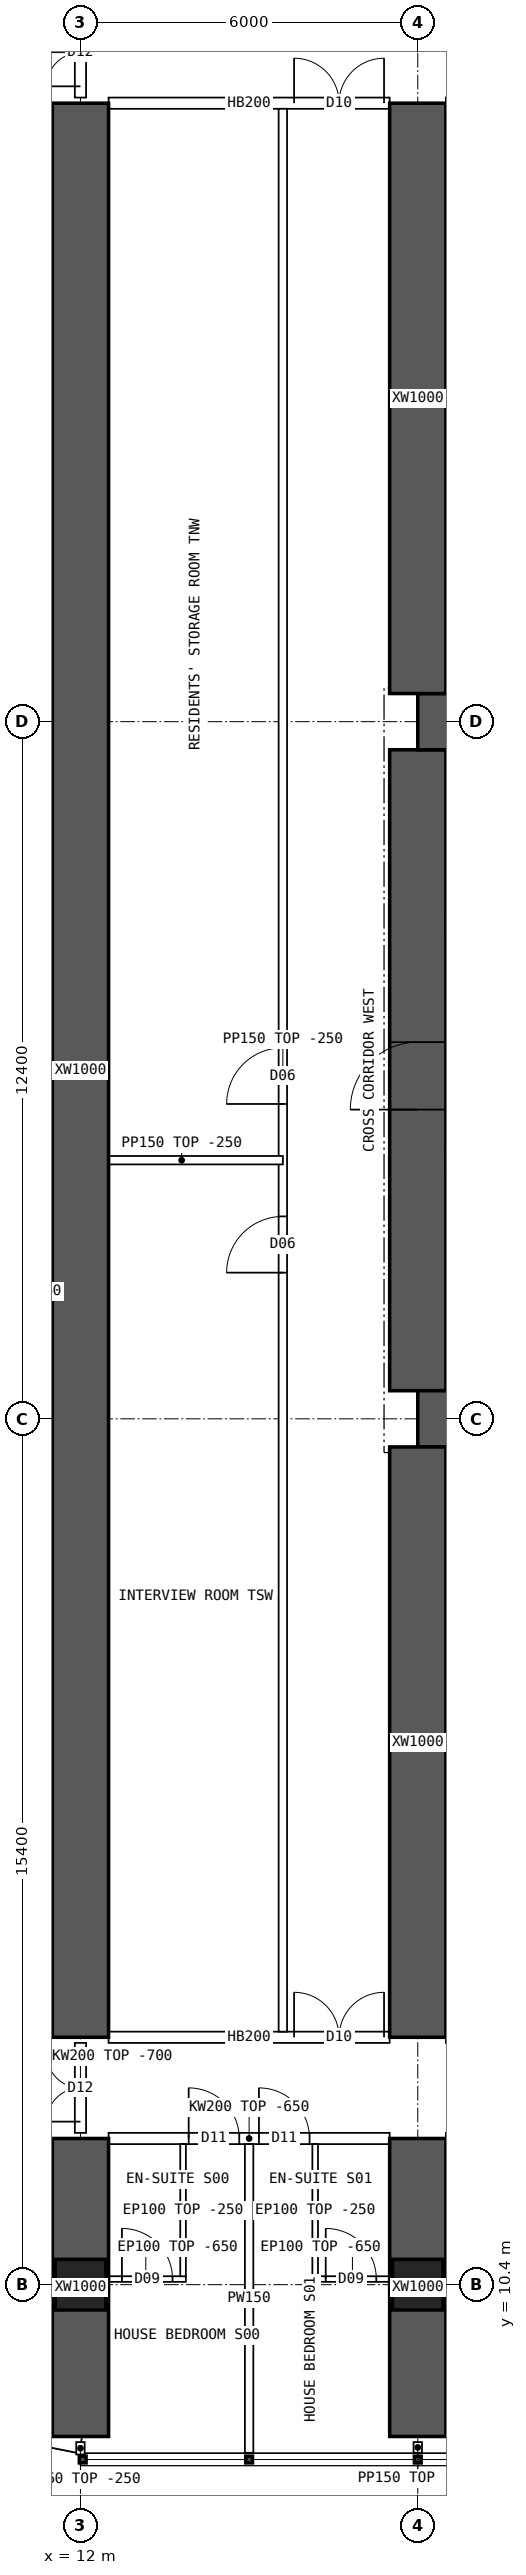
"""IFC4 building model, lengths in metres.
Left out: names, types, materials, properties, quantities, classifications, styles, units other than length and angle.
Written with IfcOpenShell. Run it as: python <this file> out.ifc"""

import sys

from ifc_helpers import new_model, si_unit, direction, frame, frame_2d, origin, origin_2d, place, context, subcontext, project, spatial, polyline, rectangle, hollow_rectangle, outline, extrude, element, fill, save


model = new_model("IFC4")
c1 = context("Model", 3, precision=1e-05, world=origin(), true_north=direction((0.0, 1.0)))
c2 = subcontext(c1, "Body", "Model", "MODEL_VIEW")
j1 = project(units=[si_unit("LENGTHUNIT", "METRE"), si_unit("PLANEANGLEUNIT", "RADIAN")], contexts=[c1])
p1 = place(None, origin())
s1 = spatial("IfcSite", under=j1, at=p1, CompositionType="ELEMENT")
p2 = place(p1, origin())
s2 = spatial("IfcBuilding", under=s1, at=p2, CompositionType="ELEMENT")
p3 = place(p2, frame((0.0, 0.0, 27.7)))
s3 = spatial("IfcBuildingStorey", under=s2, at=p3, CompositionType="ELEMENT", Elevation=27.7)
for number, where, z_axis, x_axis in (
    (1, (12.0, 10.4, 0.0), (0.0, 0.0, 1.0), (1.0, 0.0, 0.0)),
    (2, (18.0, 10.4, 0.0), (0.0, 0.0, 1.0), (1.0, 0.0, 0.0)),
):
    element("IfcColumn", number, at=place(p3, frame(where, z_axis=z_axis, x_axis=x_axis)), inside=s3, PredefinedType="COLUMN", context=c2, shape_type="SweptSolid", body=[
        extrude(hollow_rectangle(XDim=0.9, YDim=0.9, WallThickness=0.09, at=origin_2d()), origin(), (0.0, 0.0, 1.0), 3.75),
    ])
for number, where, z_axis, x_axis in (
    (3, (18.0, 25.8, 0.0), (0.0, 0.0, 1.0), (1.0, 0.0, 0.0)),
    (4, (18.0, 38.2, 0.0), (0.0, 0.0, 1.0), (1.0, 0.0, 0.0)),
):
    element("IfcWall", number, at=place(p3, frame(where, z_axis=z_axis, x_axis=x_axis)), inside=s3, PredefinedType="SHEAR", context=c2, shape_type="SweptSolid", body=[
        extrude(rectangle(XDim=48.0, YDim=1.0, at=frame_2d((24.0, 0.0))), origin(), (0.0, 0.0, 1.0), 3.75),
    ])
p4 = place(p3, frame((18.0, 26.3, 0.0), z_axis=(0.0, 0.0, 1.0), x_axis=(0.0, 1.0, 0.0)))
e5 = element("IfcWall", 5, at=p4, inside=s3, PredefinedType="SHEAR", context=c2, shape_type="SweptSolid", body=[
    extrude(rectangle(XDim=11.4, YDim=1.0, at=frame_2d((5.7, 0.0))), origin(), (0.0, 0.0, 1.0), 3.75),
])
p5 = place(p4, frame((5.0, 0.0, 0.0)))
e6 = element("IfcOpeningElement", 6, at=p5, cuts=e5, PredefinedType="OPENING", context=c2, shape_type="SweptSolid", body=[
    extrude(rectangle(XDim=1.2, YDim=2.1, at=frame_2d((0.6, 1.05))), frame((0.0, 0.51, 0.0), z_axis=(0.0, -1.0, 0.0), x_axis=(1.0, 0.0, 0.0)), (0.0, 0.0, 1.0), 1.02),
])
p6 = place(p3, frame((12.0, 7.7, 0.0), z_axis=(0.0, 0.0, 1.0), x_axis=(0.0, 1.0, 0.0)))
e7 = element("IfcWall", 7, at=p6, inside=s3, PredefinedType="SHEAR", context=c2, shape_type="SweptSolid", body=[
    extrude(rectangle(XDim=5.3, YDim=1.0, at=frame_2d((2.65, 0.0))), origin(), (0.0, 0.0, 1.0), 3.75),
])
p7 = place(p3, frame((12.0, 14.8, 0.0), z_axis=(0.0, 0.0, 1.0), x_axis=(0.0, 1.0, 0.0)))
e8 = element("IfcWall", 8, at=p7, inside=s3, PredefinedType="SHEAR", context=c2, shape_type="SweptSolid", body=[
    extrude(rectangle(XDim=34.4, YDim=1.0, at=frame_2d((17.2, 0.0))), origin(), (0.0, 0.0, 1.0), 3.75),
])
p8 = place(p3, frame((18.0, 7.7, 0.0), z_axis=(0.0, 0.0, 1.0), x_axis=(0.0, 1.0, 0.0)))
e9 = element("IfcWall", 9, at=p8, inside=s3, PredefinedType="SHEAR", context=c2, shape_type="SweptSolid", body=[
    extrude(rectangle(XDim=5.3, YDim=1.0, at=frame_2d((2.65, 0.0))), origin(), (0.0, 0.0, 1.0), 3.75),
])
for number, where, z_axis, x_axis in (
    (10, (18.0, 14.8, 0.0), (0.0, 0.0, 1.0), (0.0, 1.0, 0.0)),
    (11, (18.0, 38.7, 0.0), (0.0, 0.0, 1.0), (0.0, 1.0, 0.0)),
):
    element("IfcWall", number, at=place(p3, frame(where, z_axis=z_axis, x_axis=x_axis)), inside=s3, PredefinedType="SHEAR", context=c2, shape_type="SweptSolid", body=[
        extrude(rectangle(XDim=10.5, YDim=1.0, at=frame_2d((5.25, 0.0))), origin(), (0.0, 0.0, 1.0), 3.75),
    ])
p9 = place(p3, frame((8.843, 8.178, 0.0), z_axis=(0.0, 0.0, 1.0), x_axis=(0.980787251524, -0.195080412259, 0.0)))
e12 = element("IfcWall", 12, at=p9, inside=s3, PredefinedType="SOLIDWALL", context=c2, shape_type="SweptSolid", body=[
    extrude(outline(polyline([(-0.03, -0.15), (3.249, -0.15), (3.189, 0.15), (0.03, 0.15), (-0.03, -0.15)])), origin(), (0.0, 0.0, 1.0), 3.5),
])
p10 = place(p9, frame((0.909, 0.0, 0.9)))
e13 = element("IfcOpeningElement", 13, at=p10, cuts=e12, PredefinedType="OPENING", context=c2, shape_type="SweptSolid", body=[
    extrude(rectangle(XDim=1.4, YDim=1.8, at=frame_2d((0.7, 0.9))), frame((0.0, 0.16, 0.0), z_axis=(0.0, -1.0, 0.0), x_axis=(1.0, 0.0, 0.0)), (0.0, 0.0, 1.0), 0.32),
])
p11 = place(p3, frame((12.5, 13.0, 0.0), z_axis=(0.0, 0.0, 1.0), x_axis=(1.0, 0.0, 0.0)))
e14 = element("IfcWall", 14, at=p11, inside=s3, PredefinedType="SOLIDWALL", context=c2, shape_type="SweptSolid", body=[
    extrude(outline(polyline([(0.0, 0.0), (5.0, 0.0), (5.0, 3.1), (0.0, 3.1), (0.0, 0.0)])), frame((0.0, 0.1, 0.0), z_axis=(0.0, -1.0, 0.0), x_axis=(1.0, 0.0, 0.0)), (0.0, 0.0, 1.0), 0.2),
])
p12 = place(p11, frame((1.425, 0.0, 0.0)))
e15 = element("IfcOpeningElement", 15, at=p12, cuts=e14, PredefinedType="OPENING", context=c2, shape_type="SweptSolid", body=[
    extrude(rectangle(XDim=0.9, YDim=2.1, at=frame_2d((0.45, 1.05))), frame((0.0, 0.11, 0.0), z_axis=(0.0, -1.0, 0.0), x_axis=(1.0, 0.0, 0.0)), (0.0, 0.0, 1.0), 0.22),
])
p13 = place(p11, frame((2.675, 0.0, 0.0)))
e16 = element("IfcOpeningElement", 16, at=p13, cuts=e14, PredefinedType="OPENING", context=c2, shape_type="SweptSolid", body=[
    extrude(rectangle(XDim=0.9, YDim=2.1, at=frame_2d((0.45, 1.05))), frame((0.0, 0.11, 0.0), z_axis=(0.0, -1.0, 0.0), x_axis=(1.0, 0.0, 0.0)), (0.0, 0.0, 1.0), 0.22),
])
p14 = place(p3, frame((12.5, 14.8, 0.0), z_axis=(0.0, 0.0, 1.0), x_axis=(1.0, 0.0, 0.0)))
e17 = element("IfcWall", 17, at=p14, inside=s3, PredefinedType="SOLIDWALL", context=c2, shape_type="SweptSolid", body=[
    extrude(rectangle(XDim=5.0, YDim=0.2, at=frame_2d((2.5, 0.0))), origin(), (0.0, 0.0, 1.0), 3.5),
])
p15 = place(p14, frame((3.3, 0.0, 0.0)))
e18 = element("IfcOpeningElement", 18, at=p15, cuts=e17, PredefinedType="OPENING", context=c2, shape_type="SweptSolid", body=[
    extrude(rectangle(XDim=1.6, YDim=2.1, at=frame_2d((0.8, 1.05))), frame((0.0, 0.11, 0.0), z_axis=(0.0, -1.0, 0.0), x_axis=(1.0, 0.0, 0.0)), (0.0, 0.0, 1.0), 0.22),
])
p16 = place(p3, frame((12.5, 49.2, 0.0), z_axis=(0.0, 0.0, 1.0), x_axis=(1.0, 0.0, 0.0)))
e19 = element("IfcWall", 19, at=p16, inside=s3, PredefinedType="SOLIDWALL", context=c2, shape_type="SweptSolid", body=[
    extrude(rectangle(XDim=5.0, YDim=0.2, at=frame_2d((2.5, 0.0))), origin(), (0.0, 0.0, 1.0), 3.5),
])
p17 = place(p16, frame((3.3, 0.0, 0.0)))
e20 = element("IfcOpeningElement", 20, at=p17, cuts=e19, PredefinedType="OPENING", context=c2, shape_type="SweptSolid", body=[
    extrude(rectangle(XDim=1.6, YDim=2.1, at=frame_2d((0.8, 1.05))), frame((0.0, 0.11, 0.0), z_axis=(0.0, -1.0, 0.0), x_axis=(1.0, 0.0, 0.0)), (0.0, 0.0, 1.0), 0.22),
])
p18 = place(p3, frame((15.0, 7.41, 0.0), z_axis=(0.0, 0.0, 1.0), x_axis=(0.0, 1.0, 0.0)))
e21 = element("IfcWall", 21, at=p18, inside=s3, PredefinedType="PARTITIONING", context=c2, shape_type="SweptSolid", body=[
    extrude(outline(polyline([(0.0, 0.0), (5.49, 0.0), (5.49, 3.1), (5.442, 3.1), (5.44, 3.5), (3.192, 3.5), (3.19, 3.1), (2.792, 3.1), (2.79, 3.5), (0.0, 3.5), (0.0, 0.0)])), frame((0.0, 0.075, 0.0), z_axis=(0.0, -1.0, 0.0), x_axis=(1.0, 0.0, 0.0)), (0.0, 0.0, 1.0), 0.15),
])
p19 = place(p3, frame((13.875, 10.5, 0.0), z_axis=(0.0, 0.0, 1.0), x_axis=(-1.0, 0.0, 0.0)))
e22 = element("IfcWall", 22, at=p19, inside=s3, PredefinedType="PARTITIONING", context=c2, shape_type="SweptSolid", body=[
    extrude(outline(polyline([(0.0, 0.0), (1.425, 0.0), (1.425, 3.1), (0.0, 3.1), (0.0, 0.0)])), frame((0.0, 0.05, 0.0), z_axis=(0.0, -1.0, 0.0), x_axis=(1.0, 0.0, 0.0)), (0.0, 0.0, 1.0), 0.1),
])
p20 = place(p19, frame((0.238, 0.0, 0.0)))
e23 = element("IfcOpeningElement", 23, at=p20, cuts=e22, PredefinedType="OPENING", context=c2, shape_type="SweptSolid", body=[
    extrude(rectangle(XDim=0.9, YDim=2.1, at=frame_2d((0.45, 1.05))), frame((0.0, 0.06, 0.0), z_axis=(0.0, -1.0, 0.0), x_axis=(1.0, 0.0, 0.0)), (0.0, 0.0, 1.0), 0.12),
])
p21 = place(p3, frame((13.825, 10.55, 0.0), z_axis=(0.0, 0.0, 1.0), x_axis=(0.0, 1.0, 0.0)))
e24 = element("IfcWall", 24, at=p21, inside=s3, PredefinedType="PARTITIONING", context=c2, shape_type="SweptSolid", body=[
    extrude(outline(polyline([(0.0, 0.0), (2.35, 0.0), (2.35, 3.1), (2.302, 3.1), (2.3, 3.5), (0.052, 3.5), (0.05, 3.1), (0.0, 3.1), (0.0, 0.0)])), frame((0.0, 0.05, 0.0), z_axis=(0.0, -1.0, 0.0), x_axis=(1.0, 0.0, 0.0)), (0.0, 0.0, 1.0), 0.1),
])
p22 = place(p3, frame((17.55, 10.5, 0.0), z_axis=(0.0, 0.0, 1.0), x_axis=(-1.0, 0.0, 0.0)))
e25 = element("IfcWall", 25, at=p22, inside=s3, PredefinedType="PARTITIONING", context=c2, shape_type="SweptSolid", body=[
    extrude(outline(polyline([(0.0, 0.0), (1.425, 0.0), (1.425, 3.1), (0.0, 3.1), (0.0, 0.0)])), frame((0.0, 0.05, 0.0), z_axis=(0.0, -1.0, 0.0), x_axis=(1.0, 0.0, 0.0)), (0.0, 0.0, 1.0), 0.1),
])
p23 = place(p22, frame((0.288, 0.0, 0.0)))
e26 = element("IfcOpeningElement", 26, at=p23, cuts=e25, PredefinedType="OPENING", context=c2, shape_type="SweptSolid", body=[
    extrude(rectangle(XDim=0.9, YDim=2.1, at=frame_2d((0.45, 1.05))), frame((0.0, 0.06, 0.0), z_axis=(0.0, -1.0, 0.0), x_axis=(1.0, 0.0, 0.0)), (0.0, 0.0, 1.0), 0.12),
])
p24 = place(p3, frame((16.175, 10.55, 0.0), z_axis=(0.0, 0.0, 1.0), x_axis=(0.0, 1.0, 0.0)))
e27 = element("IfcWall", 27, at=p24, inside=s3, PredefinedType="PARTITIONING", context=c2, shape_type="SweptSolid", body=[
    extrude(outline(polyline([(0.0, 0.0), (2.35, 0.0), (2.35, 3.1), (2.302, 3.1), (2.3, 3.5), (0.052, 3.5), (0.05, 3.1), (0.0, 3.1), (0.0, 0.0)])), frame((0.0, 0.05, 0.0), z_axis=(0.0, -1.0, 0.0), x_axis=(1.0, 0.0, 0.0)), (0.0, 0.0, 1.0), 0.1),
])
p25 = place(p3, frame((19.875, 10.5, 0.0), z_axis=(0.0, 0.0, 1.0), x_axis=(-1.0, 0.0, 0.0)))
e28 = element("IfcWall", 28, at=p25, inside=s3, PredefinedType="PARTITIONING", context=c2, shape_type="SweptSolid", body=[
    extrude(outline(polyline([(0.0, 0.0), (1.425, 0.0), (1.425, 3.1), (0.0, 3.1), (0.0, 0.0)])), frame((0.0, 0.05, 0.0), z_axis=(0.0, -1.0, 0.0), x_axis=(1.0, 0.0, 0.0)), (0.0, 0.0, 1.0), 0.1),
])
p26 = place(p25, frame((0.238, 0.0, 0.0)))
e29 = element("IfcOpeningElement", 29, at=p26, cuts=e28, PredefinedType="OPENING", context=c2, shape_type="SweptSolid", body=[
    extrude(rectangle(XDim=0.9, YDim=2.1, at=frame_2d((0.45, 1.05))), frame((0.0, 0.06, 0.0), z_axis=(0.0, -1.0, 0.0), x_axis=(1.0, 0.0, 0.0)), (0.0, 0.0, 1.0), 0.12),
])
p27 = place(p3, frame((15.6, 14.9, 0.0), z_axis=(0.0, 0.0, 1.0), x_axis=(0.0, 1.0, 0.0)))
e30 = element("IfcWall", 30, at=p27, inside=s3, PredefinedType="PARTITIONING", context=c2, shape_type="SweptSolid", body=[
    extrude(rectangle(XDim=34.2, YDim=0.15, at=frame_2d((17.1, 0.0))), origin(), (0.0, 0.0, 1.0), 3.5),
])
p28 = place(p27, frame((13.5, 0.0, 0.0)))
e31 = element("IfcOpeningElement", 31, at=p28, cuts=e30, PredefinedType="OPENING", context=c2, shape_type="SweptSolid", body=[
    extrude(rectangle(XDim=1.0, YDim=2.1, at=frame_2d((0.5, 1.05))), frame((0.0, 0.085, 0.0), z_axis=(0.0, -1.0, 0.0), x_axis=(1.0, 0.0, 0.0)), (0.0, 0.0, 1.0), 0.17),
])
p29 = place(p27, frame((16.5, 0.0, 0.0)))
e32 = element("IfcOpeningElement", 32, at=p29, cuts=e30, PredefinedType="OPENING", context=c2, shape_type="SweptSolid", body=[
    extrude(rectangle(XDim=1.0, YDim=2.1, at=frame_2d((0.5, 1.05))), frame((0.0, 0.085, 0.0), z_axis=(0.0, -1.0, 0.0), x_axis=(1.0, 0.0, 0.0)), (0.0, 0.0, 1.0), 0.17),
])
p30 = place(p3, frame((12.0, 30.4, 0.0), z_axis=(0.0, 0.0, 1.0), x_axis=(1.0, 0.0, 0.0)))
e33 = element("IfcWall", 33, at=p30, inside=s3, PredefinedType="PARTITIONING", context=c2, shape_type="SweptSolid", body=[
    extrude(rectangle(XDim=3.6, YDim=0.15, at=frame_2d((1.8, 0.0))), origin(), (0.0, 0.0, 1.0), 3.5),
])
p31 = place(p3, frame((3.905, 30.85, 0.0), z_axis=(0.0, 0.0, 1.0), x_axis=(1.0, 0.0, 0.0)))
e34 = element("IfcWall", 34, at=p31, inside=s3, PredefinedType="PARTITIONING", context=c2, shape_type="SweptSolid", body=[
    extrude(outline(polyline([(0.0, 0.0), (8.02, 0.0), (8.02, 3.5), (2.397, 3.5), (2.395, 3.05), (1.797, 3.05), (1.795, 3.5), (0.0, 3.5), (0.0, 0.0)])), frame((0.0, 0.075, 0.0), z_axis=(0.0, -1.0, 0.0), x_axis=(1.0, 0.0, 0.0)), (0.0, 0.0, 1.0), 0.15),
])
p32 = place(p3, frame((12.0, 13.1, 0.0), z_axis=(0.0, 0.0, 1.0), x_axis=(0.0, 1.0, 0.0)))
e35 = element("IfcWall", 35, at=p32, inside=s3, PredefinedType="SOLIDWALL", context=c2, shape_type="SweptSolid", body=[
    extrude(outline(polyline([(0.0, 0.0), (1.6, 0.0), (1.6, 3.05), (0.0, 3.05), (0.0, 0.0)])), frame((0.0, 0.1, 0.0), z_axis=(0.0, -1.0, 0.0), x_axis=(1.0, 0.0, 0.0)), (0.0, 0.0, 1.0), 0.2),
])
p33 = place(p32, frame((0.2, 0.0, 0.0)))
e36 = element("IfcOpeningElement", 36, at=p33, cuts=e35, PredefinedType="OPENING", context=c2, shape_type="SweptSolid", body=[
    extrude(rectangle(XDim=1.2, YDim=2.1, at=frame_2d((0.6, 1.05))), frame((0.0, 0.11, 0.0), z_axis=(0.0, -1.0, 0.0), x_axis=(1.0, 0.0, 0.0)), (0.0, 0.0, 1.0), 0.22),
])
p34 = place(p3, frame((12.0, 49.3, 0.0), z_axis=(0.0, 0.0, 1.0), x_axis=(0.0, 1.0, 0.0)))
e37 = element("IfcWall", 37, at=p34, inside=s3, PredefinedType="SOLIDWALL", context=c2, shape_type="SweptSolid", body=[
    extrude(outline(polyline([(0.0, 0.0), (1.6, 0.0), (1.6, 3.05), (0.0, 3.05), (0.0, 0.0)])), frame((0.0, 0.1, 0.0), z_axis=(0.0, -1.0, 0.0), x_axis=(1.0, 0.0, 0.0)), (0.0, 0.0, 1.0), 0.2),
])
p35 = place(p34, frame((0.2, 0.0, 0.0)))
e38 = element("IfcOpeningElement", 38, at=p35, cuts=e37, PredefinedType="OPENING", context=c2, shape_type="SweptSolid", body=[
    extrude(rectangle(XDim=1.2, YDim=2.1, at=frame_2d((0.6, 1.05))), frame((0.0, 0.11, 0.0), z_axis=(0.0, -1.0, 0.0), x_axis=(1.0, 0.0, 0.0)), (0.0, 0.0, 1.0), 0.22),
])
p36 = place(p3, frame((12.0, 7.6, 0.0), z_axis=(0.0, 0.0, 1.0), x_axis=(0.0, -1.0, 0.0)))
e39 = element("IfcWall", 39, at=p36, inside=s3, PredefinedType="PARTITIONING", context=c2, shape_type="SweptSolid", body=[
    extrude(rectangle(XDim=0.22, YDim=0.15, at=frame_2d((0.11, 0.0))), origin(), (0.0, 0.0, 1.0), 3.5),
])
p37 = place(p3, frame((18.0, 7.6, 0.0), z_axis=(0.0, 0.0, 1.0), x_axis=(0.0, -1.0, 0.0)))
e40 = element("IfcWall", 40, at=p37, inside=s3, PredefinedType="PARTITIONING", context=c2, shape_type="SweptSolid", body=[
    extrude(rectangle(XDim=0.19, YDim=0.15, at=frame_2d((0.095, 0.0))), origin(), (0.0, 0.0, 1.0), 3.5),
])
p38 = place(p5, origin())
e41 = element("IfcDoor", 41, at=p38, inside=s3, OperationType="SINGLE_SWING_LEFT", PredefinedType="DOOR", context=c2, shape_type="SweptSolid", body=[
    extrude(rectangle(XDim=1.2, YDim=2.1, at=frame_2d((0.6, 1.05))), frame((0.0, 0.025, 0.0), z_axis=(0.0, -1.0, 0.0), x_axis=(1.0, 0.0, 0.0)), (0.0, 0.0, 1.0), 0.05),
])
fill(e6, e41)
p39 = place(p15, origin())
e42 = element("IfcDoor", 42, at=p39, inside=s3, OperationType="DOUBLE_DOOR_SINGLE_SWING", PredefinedType="DOOR", context=c2, shape_type="SweptSolid", body=[
    extrude(rectangle(XDim=1.6, YDim=2.1, at=frame_2d((0.8, 1.05))), frame((0.0, 0.025, 0.0), z_axis=(0.0, -1.0, 0.0), x_axis=(1.0, 0.0, 0.0)), (0.0, 0.0, 1.0), 0.05),
])
fill(e18, e42)
p40 = place(p17, origin())
e43 = element("IfcDoor", 43, at=p40, inside=s3, OperationType="DOUBLE_DOOR_SINGLE_SWING", PredefinedType="DOOR", context=c2, shape_type="SweptSolid", body=[
    extrude(rectangle(XDim=1.6, YDim=2.1, at=frame_2d((0.8, 1.05))), frame((0.0, 0.025, 0.0), z_axis=(0.0, -1.0, 0.0), x_axis=(1.0, 0.0, 0.0)), (0.0, 0.0, 1.0), 0.05),
])
fill(e20, e43)
p41 = place(p20, origin())
e44 = element("IfcDoor", 44, at=p41, inside=s3, OperationType="SINGLE_SWING_RIGHT", PredefinedType="DOOR", context=c2, shape_type="SweptSolid", body=[
    extrude(rectangle(XDim=0.9, YDim=2.1, at=frame_2d((0.45, 1.05))), frame((0.0, 0.025, 0.0), z_axis=(0.0, -1.0, 0.0), x_axis=(1.0, 0.0, 0.0)), (0.0, 0.0, 1.0), 0.05),
])
fill(e23, e44)
p42 = place(p12, origin())
e45 = element("IfcDoor", 45, at=p42, inside=s3, OperationType="SINGLE_SWING_LEFT", PredefinedType="DOOR", context=c2, shape_type="SweptSolid", body=[
    extrude(rectangle(XDim=0.9, YDim=2.1, at=frame_2d((0.45, 1.05))), frame((0.0, 0.025, 0.0), z_axis=(0.0, -1.0, 0.0), x_axis=(1.0, 0.0, 0.0)), (0.0, 0.0, 1.0), 0.05),
])
fill(e15, e45)
p43 = place(p23, origin())
e46 = element("IfcDoor", 46, at=p43, inside=s3, OperationType="SINGLE_SWING_RIGHT", PredefinedType="DOOR", context=c2, shape_type="SweptSolid", body=[
    extrude(rectangle(XDim=0.9, YDim=2.1, at=frame_2d((0.45, 1.05))), frame((0.0, 0.025, 0.0), z_axis=(0.0, -1.0, 0.0), x_axis=(1.0, 0.0, 0.0)), (0.0, 0.0, 1.0), 0.05),
])
fill(e26, e46)
p44 = place(p13, origin())
e47 = element("IfcDoor", 47, at=p44, inside=s3, OperationType="SINGLE_SWING_LEFT", PredefinedType="DOOR", context=c2, shape_type="SweptSolid", body=[
    extrude(rectangle(XDim=0.9, YDim=2.1, at=frame_2d((0.45, 1.05))), frame((0.0, 0.025, 0.0), z_axis=(0.0, -1.0, 0.0), x_axis=(1.0, 0.0, 0.0)), (0.0, 0.0, 1.0), 0.05),
])
fill(e16, e47)
p45 = place(p28, origin())
e48 = element("IfcDoor", 48, at=p45, inside=s3, OperationType="SINGLE_SWING_LEFT", PredefinedType="DOOR", context=c2, shape_type="SweptSolid", body=[
    extrude(rectangle(XDim=1.0, YDim=2.1, at=frame_2d((0.5, 1.05))), frame((0.0, 0.025, 0.0), z_axis=(0.0, -1.0, 0.0), x_axis=(1.0, 0.0, 0.0)), (0.0, 0.0, 1.0), 0.05),
])
fill(e31, e48)
p46 = place(p29, origin())
e49 = element("IfcDoor", 49, at=p46, inside=s3, OperationType="SINGLE_SWING_LEFT", PredefinedType="DOOR", context=c2, shape_type="SweptSolid", body=[
    extrude(rectangle(XDim=1.0, YDim=2.1, at=frame_2d((0.5, 1.05))), frame((0.0, 0.025, 0.0), z_axis=(0.0, -1.0, 0.0), x_axis=(1.0, 0.0, 0.0)), (0.0, 0.0, 1.0), 0.05),
])
fill(e32, e49)
p47 = place(p33, origin())
e50 = element("IfcDoor", 50, at=p47, inside=s3, OperationType="DOUBLE_DOOR_SINGLE_SWING", PredefinedType="DOOR", context=c2, shape_type="SweptSolid", body=[
    extrude(rectangle(XDim=1.2, YDim=2.1, at=frame_2d((0.6, 1.05))), frame((0.0, 0.025, 0.0), z_axis=(0.0, -1.0, 0.0), x_axis=(1.0, 0.0, 0.0)), (0.0, 0.0, 1.0), 0.05),
])
fill(e36, e50)
p48 = place(p35, origin())
e51 = element("IfcDoor", 51, at=p48, inside=s3, OperationType="DOUBLE_DOOR_SINGLE_SWING", PredefinedType="DOOR", context=c2, shape_type="SweptSolid", body=[
    extrude(rectangle(XDim=1.2, YDim=2.1, at=frame_2d((0.6, 1.05))), frame((0.0, 0.025, 0.0), z_axis=(0.0, -1.0, 0.0), x_axis=(1.0, 0.0, 0.0)), (0.0, 0.0, 1.0), 0.05),
])
fill(e38, e51)
save(model, sys.argv[1])
